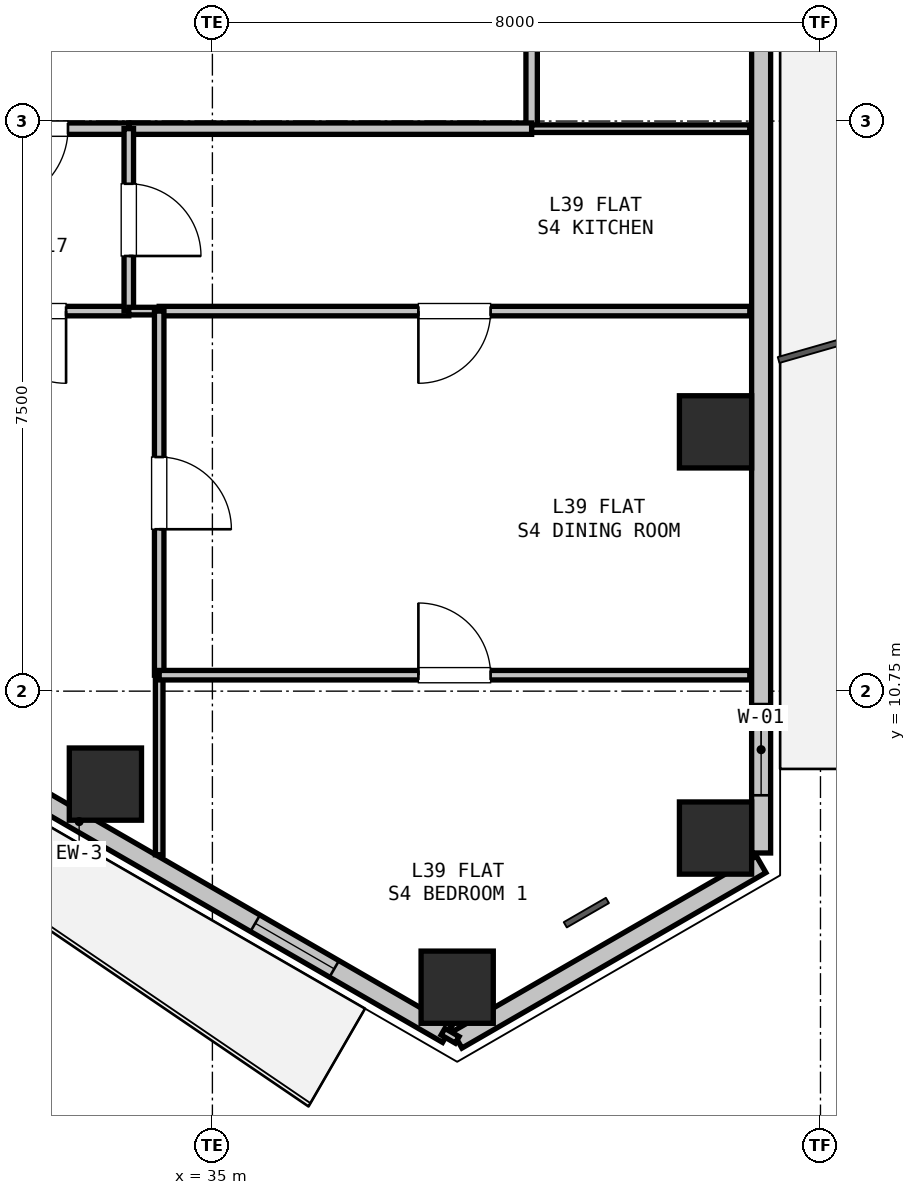
"""IFC4 building model, lengths in metres.
Left out: names, types, materials, properties, quantities, classifications, styles, units other than length and angle.
Written with IfcOpenShell. Run it as: python <this file> out.ifc"""

import sys

from ifc_helpers import new_model, si_unit, direction, frame, frame_2d, origin, origin_2d, place, context, subcontext, project, spatial, rectangle, hollow_rectangle, extrude, element, fill, save


model = new_model("IFC4")
c1 = context("Model", 3, precision=1e-05, world=origin(), true_north=direction((0.0, 1.0)))
c2 = subcontext(c1, "Body", "Model", "MODEL_VIEW")
j1 = project(units=[si_unit("LENGTHUNIT", "METRE"), si_unit("PLANEANGLEUNIT", "RADIAN")], contexts=[c1])
p1 = place(None, origin())
s1 = spatial("IfcSite", under=j1, at=p1, CompositionType="ELEMENT")
p2 = place(p1, origin())
s2 = spatial("IfcBuilding", under=s1, at=p2, CompositionType="ELEMENT")
p3 = place(p2, frame((0.0, 0.0, 141.0)))
s3 = spatial("IfcBuildingStorey", under=s2, at=p3, CompositionType="ELEMENT", Elevation=141.0)
for number, where, z_axis, x_axis in (
    (1, (41.619, 14.161, 0.0), (0.0, 0.0, 1.0), (1.0, 0.0, 0.0)),
    (2, (41.619, 8.817, 0.0), (0.0, 0.0, 1.0), (1.0, 0.0, 0.0)),
    (3, (38.22, 6.855, 0.0), (0.0, 0.0, 1.0), (1.0, 0.0, 0.0)),
    (4, (33.593, 9.527, 0.0), (0.0, 0.0, 1.0), (1.0, 0.0, 0.0)),
):
    element("IfcColumn", number, at=place(p3, frame(where, z_axis=z_axis, x_axis=x_axis)), inside=s3, PredefinedType="COLUMN", context=c2, shape_type="SweptSolid", body=[
        extrude(hollow_rectangle(XDim=0.95, YDim=0.95, WallThickness=0.028, at=origin_2d()), origin(), (0.0, 0.0, 1.0), 3.3),
    ])
p4 = place(p3, frame((42.219, 8.471, 0.0), z_axis=(0.0, 0.0, 1.0), x_axis=(-0.866035021055, -0.499983342029, 0.0)))
e5 = element("IfcWall", 5, at=p4, inside=s3, PredefinedType="SOLIDWALL", context=c2, shape_type="SweptSolid", body=[
    extrude(rectangle(XDim=4.617, YDim=0.25, at=frame_2d((2.309, 0.0))), origin(), (0.0, 0.0, 1.0), 2.68),
])
p5 = place(p3, frame((42.219, 19.807, 0.0), z_axis=(0.0, 0.0, 1.0), x_axis=(0.0, -1.0, 0.0)))
e6 = element("IfcWall", 6, at=p5, inside=s3, PredefinedType="SOLIDWALL", context=c2, shape_type="SweptSolid", body=[
    extrude(rectangle(XDim=11.186, YDim=0.25, at=frame_2d((5.593, 0.0))), origin(), (0.0, 0.0, 1.0), 2.68),
])
p6 = place(p5, frame((9.227, 0.0, 0.9)))
e7 = element("IfcOpeningElement", 7, at=p6, cuts=e6, PredefinedType="OPENING", context=c2, shape_type="SweptSolid", body=[
    extrude(rectangle(XDim=1.2, YDim=1.4, at=frame_2d((0.6, 0.7))), frame((0.0, 0.135, 0.0), z_axis=(0.0, -1.0, 0.0), x_axis=(1.0, 0.0, 0.0)), (0.0, 0.0, 1.0), 0.27),
])
p7 = place(p3, frame((38.091, 6.237, 0.0), z_axis=(0.0, 0.0, 1.0), x_axis=(-0.86602239209, 0.500005216371, 0.0)))
e8 = element("IfcWall", 8, at=p7, inside=s3, PredefinedType="SOLIDWALL", context=c2, shape_type="SweptSolid", body=[
    extrude(rectangle(XDim=11.186, YDim=0.25, at=frame_2d((5.593, 0.0))), origin(), (0.0, 0.0, 1.0), 2.68),
])
p8 = place(p7, frame((7.095, 0.0, 0.0)))
e9 = element("IfcOpeningElement", 9, at=p8, cuts=e8, PredefinedType="OPENING", context=c2, shape_type="SweptSolid", body=[
    extrude(rectangle(XDim=1.1, YDim=2.1, at=frame_2d((0.55, 1.05))), frame((0.0, 0.135, 0.0), z_axis=(0.0, -1.0, 0.0), x_axis=(1.0, 0.0, 0.0)), (0.0, 0.0, 1.0), 0.27),
])
p9 = place(p7, frame((1.718, 0.0, 0.9)))
e10 = element("IfcOpeningElement", 10, at=p9, cuts=e8, PredefinedType="OPENING", context=c2, shape_type="SweptSolid", body=[
    extrude(rectangle(XDim=1.2, YDim=1.4, at=frame_2d((0.6, 0.7))), frame((0.0, 0.135, 0.0), z_axis=(0.0, -1.0, 0.0), x_axis=(1.0, 0.0, 0.0)), (0.0, 0.0, 1.0), 0.27),
])
p10 = place(p3, frame((39.2, 19.9, 0.0), z_axis=(0.0, 0.0, 1.0), x_axis=(0.0, -1.0, 0.0)))
e11 = element("IfcWall", 11, at=p10, inside=s3, PredefinedType="PARTITIONING", context=c2, shape_type="SweptSolid", body=[
    extrude(rectangle(XDim=1.75, YDim=0.15, at=frame_2d((0.875, 0.0))), origin(), (0.0, 0.0, 1.0), 3.06),
])
p11 = place(p3, frame((39.2, 18.15, 0.0), z_axis=(0.0, 0.0, 1.0), x_axis=(-1.0, 0.0, 0.0)))
e12 = element("IfcWall", 12, at=p11, inside=s3, PredefinedType="PARTITIONING", context=c2, shape_type="SweptSolid", body=[
    extrude(rectangle(XDim=5.3, YDim=0.15, at=frame_2d((2.65, 0.0))), origin(), (0.0, 0.0, 1.0), 2.433),
])
p12 = place(p3, frame((33.9, 18.15, 0.0), z_axis=(0.0, 0.0, 1.0), x_axis=(-1.0, 0.0, 0.0)))
e13 = element("IfcWall", 13, at=p12, inside=s3, PredefinedType="PARTITIONING", context=c2, shape_type="SweptSolid", body=[
    extrude(rectangle(XDim=2.6, YDim=0.15, at=frame_2d((1.3, 0.0))), origin(), (0.0, 0.0, 1.0), 3.06),
])
p13 = place(p12, frame((0.8, 0.0, 0.0)))
e14 = element("IfcOpeningElement", 14, at=p13, cuts=e13, PredefinedType="OPENING", context=c2, shape_type="SweptSolid", body=[
    extrude(rectangle(XDim=1.0, YDim=2.15, at=frame_2d((0.5, 1.075))), frame((0.0, 0.085, 0.0), z_axis=(0.0, -1.0, 0.0), x_axis=(1.0, 0.0, 0.0)), (0.0, 0.0, 1.0), 0.17),
])
p14 = place(p3, frame((33.9, 15.75, 0.0), z_axis=(0.0, 0.0, 1.0), x_axis=(-1.0, 0.0, 0.0)))
e15 = element("IfcWall", 15, at=p14, inside=s3, PredefinedType="PARTITIONING", context=c2, shape_type="SweptSolid", body=[
    extrude(rectangle(XDim=2.6, YDim=0.125, at=frame_2d((1.3, 0.0))), origin(), (0.0, 0.0, 1.0), 3.06),
])
p15 = place(p14, frame((0.825, 0.0, 0.0)))
e16 = element("IfcOpeningElement", 16, at=p15, cuts=e15, PredefinedType="OPENING", context=c2, shape_type="SweptSolid", body=[
    extrude(rectangle(XDim=0.95, YDim=2.1, at=frame_2d((0.475, 1.05))), frame((0.0, 0.073, 0.0), z_axis=(0.0, -1.0, 0.0), x_axis=(1.0, 0.0, 0.0)), (0.0, 0.0, 1.0), 0.145),
])
p16 = place(p3, frame((33.9, 18.15, 0.0), z_axis=(0.0, 0.0, 1.0), x_axis=(0.0, -1.0, 0.0)))
e17 = element("IfcWall", 17, at=p16, inside=s3, PredefinedType="PARTITIONING", context=c2, shape_type="SweptSolid", body=[
    extrude(rectangle(XDim=2.4, YDim=0.125, at=frame_2d((1.2, 0.0))), origin(), (0.0, 0.0, 1.0), 3.06),
])
p17 = place(p16, frame((0.725, 0.0, 0.0)))
e18 = element("IfcOpeningElement", 18, at=p17, cuts=e17, PredefinedType="OPENING", context=c2, shape_type="SweptSolid", body=[
    extrude(rectangle(XDim=0.95, YDim=2.1, at=frame_2d((0.475, 1.05))), frame((0.0, 0.073, 0.0), z_axis=(0.0, -1.0, 0.0), x_axis=(1.0, 0.0, 0.0)), (0.0, 0.0, 1.0), 0.145),
])
p18 = place(p3, frame((39.2, 18.15, 0.0), z_axis=(0.0, 0.0, 1.0), x_axis=(1.0, 0.0, 0.0)))
e19 = element("IfcWall", 19, at=p18, inside=s3, PredefinedType="PARTITIONING", context=c2, shape_type="SweptSolid", body=[
    extrude(rectangle(XDim=2.87, YDim=0.1, at=frame_2d((1.435, 0.0))), origin(), (0.0, 0.0, 1.0), 2.365),
])
p19 = place(p3, frame((42.07, 15.75, 0.0), z_axis=(0.0, 0.0, 1.0), x_axis=(-1.0, 0.0, 0.0)))
e20 = element("IfcWall", 20, at=p19, inside=s3, PredefinedType="PARTITIONING", context=c2, shape_type="SweptSolid", body=[
    extrude(rectangle(XDim=7.77, YDim=0.125, at=frame_2d((3.885, 0.0))), origin(), (0.0, 0.0, 1.0), 2.365),
])
p20 = place(p19, frame((3.41, 0.0, 0.0)))
e21 = element("IfcOpeningElement", 21, at=p20, cuts=e20, PredefinedType="OPENING", context=c2, shape_type="SweptSolid", body=[
    extrude(rectangle(XDim=0.95, YDim=2.1, at=frame_2d((0.475, 1.05))), frame((0.0, 0.073, 0.0), z_axis=(0.0, -1.0, 0.0), x_axis=(1.0, 0.0, 0.0)), (0.0, 0.0, 1.0), 0.145),
])
p21 = place(p3, frame((34.3, 15.75, 0.0), z_axis=(0.0, 0.0, 1.0), x_axis=(-1.0, 0.0, 0.0)))
e22 = element("IfcWall", 22, at=p21, inside=s3, PredefinedType="PARTITIONING", context=c2, shape_type="SweptSolid", body=[
    extrude(rectangle(XDim=0.4, YDim=0.1, at=frame_2d((0.2, 0.0))), origin(), (0.0, 0.0, 1.0), 3.06),
])
p22 = place(p3, frame((34.3, 15.75, 0.0), z_axis=(0.0, 0.0, 1.0), x_axis=(0.0, -1.0, 0.0)))
e23 = element("IfcWall", 23, at=p22, inside=s3, PredefinedType="PARTITIONING", context=c2, shape_type="SweptSolid", body=[
    extrude(rectangle(XDim=4.79, YDim=0.125, at=frame_2d((2.395, 0.0))), origin(), (0.0, 0.0, 1.0), 3.06),
])
p23 = place(p22, frame((1.92, 0.0, 0.0)))
e24 = element("IfcOpeningElement", 24, at=p23, cuts=e23, PredefinedType="OPENING", context=c2, shape_type="SweptSolid", body=[
    extrude(rectangle(XDim=0.95, YDim=2.1, at=frame_2d((0.475, 1.05))), frame((0.0, 0.073, 0.0), z_axis=(0.0, -1.0, 0.0), x_axis=(1.0, 0.0, 0.0)), (0.0, 0.0, 1.0), 0.145),
])
p24 = place(p3, frame((34.3, 10.96, 0.0), z_axis=(0.0, 0.0, 1.0), x_axis=(0.0, -1.0, 0.0)))
e25 = element("IfcWall", 25, at=p24, inside=s3, PredefinedType="PARTITIONING", context=c2, shape_type="SweptSolid", body=[
    extrude(rectangle(XDim=2.362, YDim=0.1, at=frame_2d((1.181, 0.0))), origin(), (0.0, 0.0, 1.0), 2.725),
])
p25 = place(p3, frame((34.3, 10.96, 0.0), z_axis=(0.0, 0.0, 1.0), x_axis=(1.0, 0.0, 0.0)))
e26 = element("IfcWall", 26, at=p25, inside=s3, PredefinedType="PARTITIONING", context=c2, shape_type="SweptSolid", body=[
    extrude(rectangle(XDim=7.77, YDim=0.125, at=frame_2d((3.885, 0.0))), origin(), (0.0, 0.0, 1.0), 2.433),
])
p26 = place(p25, frame((3.41, 0.0, 0.0)))
e27 = element("IfcOpeningElement", 27, at=p26, cuts=e26, PredefinedType="OPENING", context=c2, shape_type="SweptSolid", body=[
    extrude(rectangle(XDim=0.95, YDim=2.1, at=frame_2d((0.475, 1.05))), frame((0.0, 0.073, 0.0), z_axis=(0.0, -1.0, 0.0), x_axis=(1.0, 0.0, 0.0)), (0.0, 0.0, 1.0), 0.145),
])
p27 = place(p3, frame((38.221, 6.162, 0.0), z_axis=(0.0, 0.0, 1.0), x_axis=(-0.865581379588, 0.500768285049, 0.0)))
e28 = element("IfcWall", 28, at=p27, inside=s3, PredefinedType="PARTITIONING", context=c2, shape_type="SweptSolid", body=[
    extrude(rectangle(XDim=0.216, YDim=0.1, at=frame_2d((0.108, 0.0))), origin(), (0.0, 0.0, 1.0), 3.06),
])
p28 = place(p6, origin())
e29 = element("IfcWindow", 29, at=p28, inside=s3, PartitioningType="SINGLE_PANEL", PredefinedType="WINDOW", context=c2, shape_type="SweptSolid", body=[
    extrude(rectangle(XDim=1.2, YDim=1.4, at=frame_2d((0.6, 0.7))), frame((0.0, 0.03, 0.0), z_axis=(0.0, -1.0, 0.0), x_axis=(1.0, 0.0, 0.0)), (0.0, 0.0, 1.0), 0.06),
])
fill(e7, e29)
p29 = place(p9, origin())
e30 = element("IfcWindow", 30, at=p29, inside=s3, PartitioningType="SINGLE_PANEL", PredefinedType="WINDOW", context=c2, shape_type="SweptSolid", body=[
    extrude(rectangle(XDim=1.2, YDim=1.4, at=frame_2d((0.6, 0.7))), frame((0.0, 0.03, 0.0), z_axis=(0.0, -1.0, 0.0), x_axis=(1.0, 0.0, 0.0)), (0.0, 0.0, 1.0), 0.06),
])
fill(e10, e30)
p30 = place(p13, origin())
e31 = element("IfcDoor", 31, at=p30, inside=s3, OperationType="SINGLE_SWING_RIGHT", PredefinedType="DOOR", context=c2, shape_type="SweptSolid", body=[
    extrude(rectangle(XDim=1.0, YDim=2.15, at=frame_2d((0.5, 1.075))), frame((0.0, 0.025, 0.0), z_axis=(0.0, -1.0, 0.0), x_axis=(1.0, 0.0, 0.0)), (0.0, 0.0, 1.0), 0.05),
])
fill(e14, e31)
p31 = place(p17, origin())
e32 = element("IfcDoor", 32, at=p31, inside=s3, OperationType="SINGLE_SWING_RIGHT", PredefinedType="DOOR", context=c2, shape_type="SweptSolid", body=[
    extrude(rectangle(XDim=0.95, YDim=2.1, at=frame_2d((0.475, 1.05))), frame((0.0, 0.025, 0.0), z_axis=(0.0, -1.0, 0.0), x_axis=(1.0, 0.0, 0.0)), (0.0, 0.0, 1.0), 0.05),
])
fill(e18, e32)
p32 = place(p15, origin())
e33 = element("IfcDoor", 33, at=p32, inside=s3, OperationType="SINGLE_SWING_LEFT", PredefinedType="DOOR", context=c2, shape_type="SweptSolid", body=[
    extrude(rectangle(XDim=0.95, YDim=2.1, at=frame_2d((0.475, 1.05))), frame((0.0, 0.025, 0.0), z_axis=(0.0, -1.0, 0.0), x_axis=(1.0, 0.0, 0.0)), (0.0, 0.0, 1.0), 0.05),
])
fill(e16, e33)
p33 = place(p20, origin())
e34 = element("IfcDoor", 34, at=p33, inside=s3, OperationType="SINGLE_SWING_RIGHT", PredefinedType="DOOR", context=c2, shape_type="SweptSolid", body=[
    extrude(rectangle(XDim=0.95, YDim=2.1, at=frame_2d((0.475, 1.05))), frame((0.0, 0.025, 0.0), z_axis=(0.0, -1.0, 0.0), x_axis=(1.0, 0.0, 0.0)), (0.0, 0.0, 1.0), 0.05),
])
fill(e21, e34)
p34 = place(p23, origin())
e35 = element("IfcDoor", 35, at=p34, inside=s3, OperationType="SINGLE_SWING_RIGHT", PredefinedType="DOOR", context=c2, shape_type="SweptSolid", body=[
    extrude(rectangle(XDim=0.95, YDim=2.1, at=frame_2d((0.475, 1.05))), frame((0.0, 0.025, 0.0), z_axis=(0.0, -1.0, 0.0), x_axis=(1.0, 0.0, 0.0)), (0.0, 0.0, 1.0), 0.05),
])
fill(e24, e35)
p35 = place(p26, origin())
e36 = element("IfcDoor", 36, at=p35, inside=s3, OperationType="SINGLE_SWING_LEFT", PredefinedType="DOOR", context=c2, shape_type="SweptSolid", body=[
    extrude(rectangle(XDim=0.95, YDim=2.1, at=frame_2d((0.475, 1.05))), frame((0.0, 0.025, 0.0), z_axis=(0.0, -1.0, 0.0), x_axis=(1.0, 0.0, 0.0)), (0.0, 0.0, 1.0), 0.05),
])
fill(e27, e36)
save(model, sys.argv[1])
